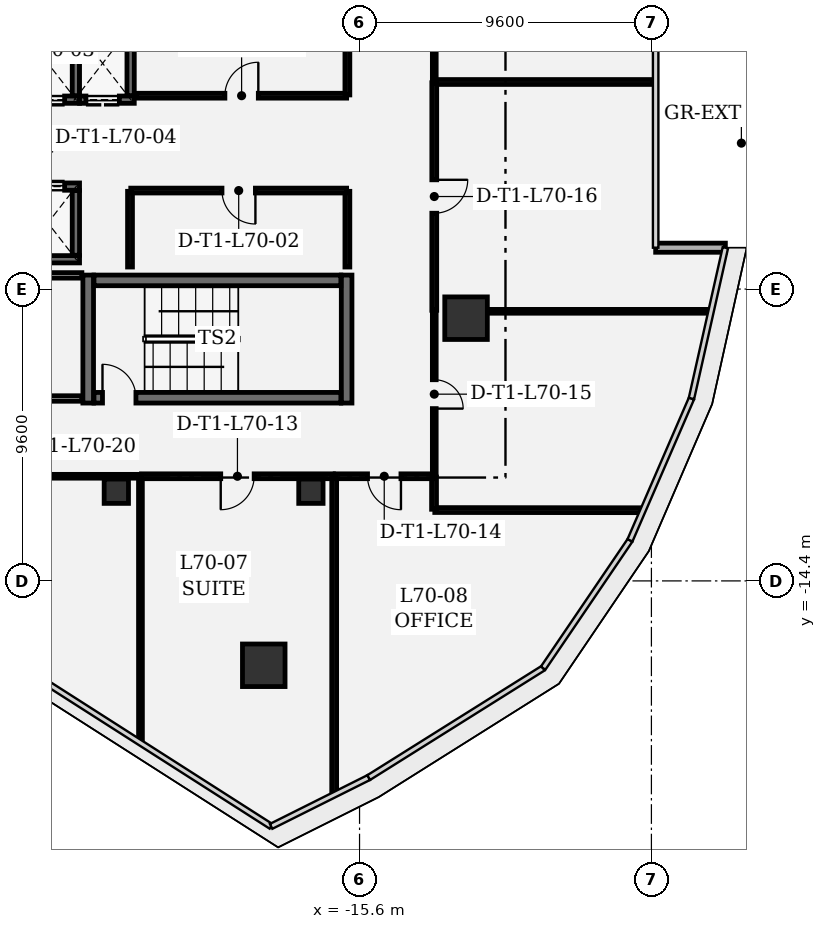
"""IFC4 building model, lengths in metres.
Left out: names, types, materials, properties, quantities, classifications, styles, units other than length and angle.
Written with IfcOpenShell. Run it as: python <this file> out.ifc"""

import sys

from ifc_helpers import new_model, si_unit, direction, frame, frame_2d, origin, origin_2d, place, context, subcontext, project, spatial, rectangle, extrude, element, fill, save


model = new_model("IFC4")
c1 = context("Model", 3, precision=1e-05, world=origin(), true_north=direction((0.0, 1.0)))
c2 = subcontext(c1, "Body", "Model", "MODEL_VIEW")
j1 = project(units=[si_unit("LENGTHUNIT", "METRE"), si_unit("PLANEANGLEUNIT", "RADIAN")], contexts=[c1])
p1 = place(None, origin())
s1 = spatial("IfcSite", under=j1, at=p1, CompositionType="ELEMENT")
p2 = place(p1, origin())
s2 = spatial("IfcBuilding", under=s1, at=p2, CompositionType="ELEMENT")
p3 = place(p2, frame((0.0, 0.0, 301.8)))
s3 = spatial("IfcBuildingStorey", under=s2, at=p3, CompositionType="ELEMENT", Elevation=301.8)
for number, where, z_axis, x_axis in (
    (1, (-18.75, -17.176, 0.0), (0.0, 0.0, 1.0), (1.0, 0.0, 0.0)),
    (2, (-12.097, -5.758, 0.0), (0.0, 0.0, 1.0), (1.0, 0.0, 0.0)),
):
    element("IfcColumn", number, at=place(p3, frame(where, z_axis=z_axis, x_axis=x_axis)), inside=s3, PredefinedType="COLUMN", context=c2, shape_type="SweptSolid", body=[
        extrude(rectangle(XDim=1.4, YDim=1.4, at=origin_2d()), origin(), (0.0, 0.0, 1.0), 4.2),
    ])
for number, where, z_axis, x_axis in (
    (3, (-17.2, -11.45, 0.0), (0.0, 0.0, 1.0), (1.0, 0.0, 0.0)),
    (4, (-23.6, -11.45, 0.0), (0.0, 0.0, 1.0), (1.0, 0.0, 0.0)),
):
    element("IfcColumn", number, at=place(p3, frame(where, z_axis=z_axis, x_axis=x_axis)), inside=s3, PredefinedType="COLUMN", context=c2, shape_type="SweptSolid", body=[
        extrude(rectangle(XDim=0.8, YDim=0.8, at=origin_2d()), origin(), (0.0, 0.0, 1.0), 4.2),
    ])
p4 = place(p3, frame((-3.567, -3.44, 0.0), z_axis=(0.0, 0.0, 1.0), x_axis=(-1.0, 0.0, 0.0)))
e5 = element("IfcWall", 5, at=p4, inside=s3, PredefinedType="SOLIDWALL", context=c2, shape_type="SweptSolid", body=[
    extrude(rectangle(XDim=2.293, YDim=0.3, at=frame_2d((1.146, 0.0))), origin(), (0.0, 0.0, 1.0), 3.91),
])
for number, where, z_axis, x_axis in (
    (6, (-24.525, -4.34, 0.0), (0.0, 0.0, 1.0), (0.0, -1.0, 0.0)),
    (7, (-16.025, -8.55, 0.0), (0.0, 0.0, 1.0), (0.0, 1.0, 0.0)),
):
    element("IfcWall", number, at=place(p3, frame(where, z_axis=z_axis, x_axis=x_axis)), inside=s3, PredefinedType="SHEAR", context=c2, shape_type="SweptSolid", body=[
        extrude(rectangle(XDim=4.21, YDim=0.35, at=frame_2d((2.105, 0.0))), origin(), (0.0, 0.0, 1.0), 3.91),
    ])
p5 = place(p3, frame((-24.335, -8.375, 0.0), z_axis=(0.0, 0.0, 1.0), x_axis=(1.0, 0.0, 0.0)))
e8 = element("IfcWall", 8, at=p5, inside=s3, PredefinedType="SHEAR", context=c2, shape_type="SweptSolid", body=[
    extrude(rectangle(XDim=8.12, YDim=0.35, at=frame_2d((4.06, 0.0))), origin(), (0.0, 0.0, 1.0), 3.91),
])
p6 = place(p5, frame((0.28, 0.0, 0.0)))
e9 = element("IfcOpeningElement", 9, at=p6, cuts=e8, PredefinedType="OPENING", context=c2, shape_type="SweptSolid", body=[
    extrude(rectangle(XDim=1.1, YDim=2.2, at=frame_2d((0.55, 1.1))), frame((0.0, 0.185, 0.0), z_axis=(0.0, -1.0, 0.0), x_axis=(1.0, 0.0, 0.0)), (0.0, 0.0, 1.0), 0.37),
])
p7 = place(p3, frame((-16.215, -4.515, 0.0), z_axis=(0.0, 0.0, 1.0), x_axis=(-1.0, 0.0, 0.0)))
e10 = element("IfcWall", 10, at=p7, inside=s3, PredefinedType="SHEAR", context=c2, shape_type="SweptSolid", body=[
    extrude(rectangle(XDim=8.12, YDim=0.35, at=frame_2d((4.06, 0.0))), origin(), (0.0, 0.0, 1.0), 3.91),
])
p8 = place(p3, frame((-24.81, 1.43, 0.0), z_axis=(0.0, 0.0, 1.0), x_axis=(-1.0, 0.0, 0.0)))
e11 = element("IfcWall", 11, at=p8, inside=s3, PredefinedType="SHEAR", context=c2, shape_type="SweptSolid", body=[
    extrude(rectangle(XDim=2.08, YDim=0.24, at=frame_2d((1.04, 0.0))), origin(), (0.0, 0.0, 1.0), 3.91),
])
p9 = place(p8, frame((0.49, 0.0, 0.0)))
e12 = element("IfcOpeningElement", 12, at=p9, cuts=e11, PredefinedType="OPENING", context=c2, shape_type="SweptSolid", body=[
    extrude(rectangle(XDim=1.1, YDim=2.2, at=frame_2d((0.55, 1.1))), frame((0.0, 0.13, 0.0), z_axis=(0.0, -1.0, 0.0), x_axis=(1.0, 0.0, 0.0)), (0.0, 0.0, 1.0), 0.26),
])
p10 = place(p3, frame((-24.93, 3.688, 0.0), z_axis=(0.0, 0.0, 1.0), x_axis=(0.0, -1.0, 0.0)))
e13 = element("IfcWall", 13, at=p10, inside=s3, PredefinedType="SHEAR", context=c2, shape_type="SweptSolid", body=[
    extrude(rectangle(XDim=2.126, YDim=0.24, at=frame_2d((1.063, 0.0))), origin(), (0.0, 0.0, 1.0), 3.91),
])
p11 = place(p3, frame((-23.01, 1.43, 0.0), z_axis=(0.0, 0.0, 1.0), x_axis=(-1.0, 0.0, 0.0)))
e14 = element("IfcWall", 14, at=p11, inside=s3, PredefinedType="SHEAR", context=c2, shape_type="SweptSolid", body=[
    extrude(rectangle(XDim=1.8, YDim=0.24, at=frame_2d((0.9, 0.0))), origin(), (0.0, 0.0, 1.0), 3.91),
])
p12 = place(p11, frame((0.49, 0.0, 0.0)))
e15 = element("IfcOpeningElement", 15, at=p12, cuts=e14, PredefinedType="OPENING", context=c2, shape_type="SweptSolid", body=[
    extrude(rectangle(XDim=1.1, YDim=2.2, at=frame_2d((0.55, 1.1))), frame((0.0, 0.13, 0.0), z_axis=(0.0, -1.0, 0.0), x_axis=(1.0, 0.0, 0.0)), (0.0, 0.0, 1.0), 0.26),
])
p13 = place(p3, frame((-23.13, 3.688, 0.0), z_axis=(0.0, 0.0, 1.0), x_axis=(0.0, -1.0, 0.0)))
e16 = element("IfcWall", 16, at=p13, inside=s3, PredefinedType="SHEAR", context=c2, shape_type="SweptSolid", body=[
    extrude(rectangle(XDim=2.126, YDim=0.24, at=frame_2d((1.063, 0.0))), origin(), (0.0, 0.0, 1.0), 3.91),
])
p14 = place(p3, frame((-24.81, -3.82, 0.0), z_axis=(0.0, 0.0, 1.0), x_axis=(-1.0, 0.0, 0.0)))
e17 = element("IfcWall", 17, at=p14, inside=s3, PredefinedType="SHEAR", context=c2, shape_type="SweptSolid", body=[
    extrude(rectangle(XDim=2.08, YDim=0.24, at=frame_2d((1.04, 0.0))), origin(), (0.0, 0.0, 1.0), 3.91),
])
p15 = place(p3, frame((-26.89, -1.43, 0.0), z_axis=(0.0, 0.0, 1.0), x_axis=(1.0, 0.0, 0.0)))
e18 = element("IfcWall", 18, at=p15, inside=s3, PredefinedType="SHEAR", context=c2, shape_type="SweptSolid", body=[
    extrude(rectangle(XDim=2.08, YDim=0.24, at=frame_2d((1.04, 0.0))), origin(), (0.0, 0.0, 1.0), 3.91),
])
p16 = place(p15, frame((0.49, 0.0, 0.0)))
e19 = element("IfcOpeningElement", 19, at=p16, cuts=e18, PredefinedType="OPENING", context=c2, shape_type="SweptSolid", body=[
    extrude(rectangle(XDim=1.1, YDim=2.2, at=frame_2d((0.55, 1.1))), frame((0.0, 0.13, 0.0), z_axis=(0.0, -1.0, 0.0), x_axis=(1.0, 0.0, 0.0)), (0.0, 0.0, 1.0), 0.26),
])
p17 = place(p3, frame((-24.93, -1.562, 0.0), z_axis=(0.0, 0.0, 1.0), x_axis=(0.0, -1.0, 0.0)))
e20 = element("IfcWall", 20, at=p17, inside=s3, PredefinedType="SHEAR", context=c2, shape_type="SweptSolid", body=[
    extrude(rectangle(XDim=2.126, YDim=0.24, at=frame_2d((1.063, 0.0))), origin(), (0.0, 0.0, 1.0), 3.91),
])
p18 = place(p3, frame((-28.355, -8.4, 0.0), z_axis=(0.0, 0.0, 1.0), x_axis=(1.0, 0.0, 0.0)))
e21 = element("IfcWall", 21, at=p18, inside=s3, PredefinedType="PARTITIONING", context=c2, shape_type="SweptSolid", body=[
    extrude(rectangle(XDim=3.622, YDim=0.18, at=frame_2d((1.811, 0.0))), origin(), (0.0, 0.0, 1.0), 3.529),
])
p19 = place(p18, frame((1.311, 0.0, 0.0)))
e22 = element("IfcOpeningElement", 22, at=p19, cuts=e21, PredefinedType="OPENING", context=c2, shape_type="SweptSolid", body=[
    extrude(rectangle(XDim=1.0, YDim=2.15, at=frame_2d((0.5, 1.075))), frame((0.0, 0.1, 0.0), z_axis=(0.0, -1.0, 0.0), x_axis=(1.0, 0.0, 0.0)), (0.0, 0.0, 1.0), 0.2),
])
p20 = place(p3, frame((-24.733, -4.35, 0.0), z_axis=(0.0, 0.0, 1.0), x_axis=(-1.0, 0.0, 0.0)))
e23 = element("IfcWall", 23, at=p20, inside=s3, PredefinedType="PARTITIONING", context=c2, shape_type="SweptSolid", body=[
    extrude(rectangle(XDim=3.622, YDim=0.18, at=frame_2d((1.811, 0.0))), origin(), (0.0, 0.0, 1.0), 3.91),
])
p21 = place(p3, frame((-22.934, 1.56, 0.0), z_axis=(0.0, 0.0, 1.0), x_axis=(1.0, 0.0, 0.0)))
e24 = element("IfcWall", 24, at=p21, inside=s3, PredefinedType="PARTITIONING", context=c2, shape_type="SweptSolid", body=[
    extrude(rectangle(XDim=6.909, YDim=0.16, at=frame_2d((3.455, 0.0))), origin(), (0.0, 0.0, 1.0), 3.91),
])
p22 = place(p21, frame((2.905, 0.0, 0.0)))
e25 = element("IfcOpeningElement", 25, at=p22, cuts=e24, PredefinedType="OPENING", context=c2, shape_type="SweptSolid", body=[
    extrude(rectangle(XDim=1.1, YDim=2.15, at=frame_2d((0.55, 1.075))), frame((0.0, 0.09, 0.0), z_axis=(0.0, -1.0, 0.0), x_axis=(1.0, 0.0, 0.0)), (0.0, 0.0, 1.0), 0.18),
])
p23 = place(p3, frame((-16.0, 1.585, 0.0), z_axis=(0.0, 0.0, 1.0), x_axis=(0.0, 1.0, 0.0)))
e26 = element("IfcWall", 26, at=p23, inside=s3, PredefinedType="PARTITIONING", context=c2, shape_type="SweptSolid", body=[
    extrude(rectangle(XDim=2.302, YDim=0.16, at=frame_2d((1.151, 0.0))), origin(), (0.0, 0.0, 1.0), 3.91),
])
for number, where, z_axis, x_axis in (
    (27, (-23.15, -1.585, 0.0), (0.0, 0.0, 1.0), (0.0, -1.0, 0.0)),
    (28, (-16.0, -4.075, 0.0), (0.0, 0.0, 1.0), (0.0, 1.0, 0.0)),
):
    element("IfcWall", number, at=place(p3, frame(where, z_axis=z_axis, x_axis=x_axis)), inside=s3, PredefinedType="PARTITIONING", context=c2, shape_type="SweptSolid", body=[
        extrude(rectangle(XDim=2.49, YDim=0.16, at=frame_2d((1.245, 0.0))), origin(), (0.0, 0.0, 1.0), 3.91),
    ])
p24 = place(p3, frame((-16.025, -1.56, 0.0), z_axis=(0.0, 0.0, 1.0), x_axis=(-1.0, 0.0, 0.0)))
e29 = element("IfcWall", 29, at=p24, inside=s3, PredefinedType="PARTITIONING", context=c2, shape_type="SweptSolid", body=[
    extrude(rectangle(XDim=7.1, YDim=0.16, at=frame_2d((3.55, 0.0))), origin(), (0.0, 0.0, 1.0), 3.91),
])
p25 = place(p24, frame((3.0, 0.0, 0.0)))
e30 = element("IfcOpeningElement", 30, at=p25, cuts=e29, PredefinedType="OPENING", context=c2, shape_type="SweptSolid", body=[
    extrude(rectangle(XDim=1.1, YDim=2.15, at=frame_2d((0.55, 1.075))), frame((0.0, 0.09, 0.0), z_axis=(0.0, -1.0, 0.0), x_axis=(1.0, 0.0, 0.0)), (0.0, 0.0, 1.0), 0.18),
])
p26 = place(p3, frame((-22.832, -10.958, 0.0), z_axis=(0.0, 0.0, 1.0), x_axis=(-1.0, 0.0, 0.0)))
e31 = element("IfcWall", 31, at=p26, inside=s3, PredefinedType="PARTITIONING", context=c2, shape_type="SweptSolid", body=[
    extrude(rectangle(XDim=7.944, YDim=0.125, at=frame_2d((3.972, 0.0))), origin(), (0.0, 0.0, 1.0), 3.13),
])
p27 = place(p26, frame((5.995, 0.0, 0.0)))
e32 = element("IfcOpeningElement", 32, at=p27, cuts=e31, PredefinedType="OPENING", context=c2, shape_type="SweptSolid", body=[
    extrude(rectangle(XDim=0.95, YDim=2.15, at=frame_2d((0.475, 1.075))), frame((0.0, 0.073, 0.0), z_axis=(0.0, -1.0, 0.0), x_axis=(1.0, 0.0, 0.0)), (0.0, 0.0, 1.0), 0.145),
])
p28 = place(p3, frame((-22.805, -19.648, 0.0), z_axis=(0.0, 0.0, 1.0), x_axis=(-0.000169052178, 0.999999985711, 0.0)))
e33 = element("IfcWall", 33, at=p28, inside=s3, PredefinedType="PARTITIONING", context=c2, shape_type="SweptSolid", body=[
    extrude(rectangle(XDim=8.665, YDim=0.125, at=frame_2d((4.333, 0.0))), origin(), (0.0, 0.0, 1.0), 3.91),
])
p29 = place(p3, frame((-16.459, -10.958, 0.0), z_axis=(0.0, 0.0, 1.0), x_axis=(-1.0, 0.0, 0.0)))
e34 = element("IfcWall", 34, at=p29, inside=s3, PredefinedType="PARTITIONING", context=c2, shape_type="SweptSolid", body=[
    extrude(rectangle(XDim=6.315, YDim=0.16, at=frame_2d((3.157, 0.0))), origin(), (0.0, 0.0, 1.0), 3.529),
])
p30 = place(p29, frame((2.607, 0.0, 0.0)))
e35 = element("IfcOpeningElement", 35, at=p30, cuts=e34, PredefinedType="OPENING", context=c2, shape_type="SweptSolid", body=[
    extrude(rectangle(XDim=1.1, YDim=2.15, at=frame_2d((0.55, 1.075))), frame((0.0, 0.09, 0.0), z_axis=(0.0, -1.0, 0.0), x_axis=(1.0, 0.0, 0.0)), (0.0, 0.0, 1.0), 0.18),
])
p31 = place(p3, frame((-16.434, -21.357, 0.0), z_axis=(0.0, 0.0, 1.0), x_axis=(2.3533842e-05, 0.999999999723, 0.0)))
e36 = element("IfcWall", 36, at=p31, inside=s3, PredefinedType="PARTITIONING", context=c2, shape_type="SweptSolid", body=[
    extrude(rectangle(XDim=10.374, YDim=0.16, at=frame_2d((5.187, 0.0))), origin(), (0.0, 0.0, 1.0), 3.13),
])
p32 = place(p3, frame((-6.355, -12.075, 0.0), z_axis=(0.0, 0.0, 1.0), x_axis=(-0.999999593545, 0.000901615329, 0.0)))
e37 = element("IfcWall", 37, at=p32, inside=s3, PredefinedType="PARTITIONING", context=c2, shape_type="SweptSolid", body=[
    extrude(rectangle(XDim=6.77, YDim=0.16, at=frame_2d((3.385, 0.0))), origin(), (0.0, 0.0, 1.0), 3.91),
])
p33 = place(p3, frame((-13.15, -10.983, 0.0), z_axis=(0.0, 0.0, 1.0), x_axis=(0.0, -1.0, 0.0)))
e38 = element("IfcWall", 38, at=p33, inside=s3, PredefinedType="PARTITIONING", context=c2, shape_type="SweptSolid", body=[
    extrude(rectangle(XDim=1.061, YDim=0.16, at=frame_2d((0.53, 0.0))), origin(), (0.0, 0.0, 1.0), 3.91),
])
p34 = place(p3, frame((-13.175, -10.958, 0.0), z_axis=(0.0, 0.0, 1.0), x_axis=(-1.0, 0.0, 0.0)))
e39 = element("IfcWall", 39, at=p34, inside=s3, PredefinedType="PARTITIONING", context=c2, shape_type="SweptSolid", body=[
    extrude(rectangle(XDim=3.226, YDim=0.16, at=frame_2d((1.613, 0.0))), origin(), (0.0, 0.0, 1.0), 3.91),
])
p35 = place(p34, frame((1.063, 0.0, 0.0)))
e40 = element("IfcOpeningElement", 40, at=p35, cuts=e39, PredefinedType="OPENING", context=c2, shape_type="SweptSolid", body=[
    extrude(rectangle(XDim=1.1, YDim=2.15, at=frame_2d((0.55, 1.075))), frame((0.0, 0.09, 0.0), z_axis=(0.0, -1.0, 0.0), x_axis=(1.0, 0.0, 0.0)), (0.0, 0.0, 1.0), 0.18),
])
p36 = place(p3, frame((-4.118, -5.532, 0.0), z_axis=(0.0, 0.0, 1.0), x_axis=(-1.0, 0.0, 0.0)))
e41 = element("IfcWall", 41, at=p36, inside=s3, PredefinedType="PARTITIONING", context=c2, shape_type="SweptSolid", body=[
    extrude(rectangle(XDim=7.214, YDim=0.125, at=frame_2d((3.607, 0.0))), origin(), (0.0, 0.0, 1.0), 3.91),
])
p37 = place(p3, frame((-13.142, -5.557, 0.0), z_axis=(0.0, 0.0, 1.0), x_axis=(0.0, -1.0, 0.0)))
e42 = element("IfcWall", 42, at=p37, inside=s3, PredefinedType="PARTITIONING", context=c2, shape_type="SweptSolid", body=[
    extrude(rectangle(XDim=5.401, YDim=0.125, at=frame_2d((2.701, 0.0))), origin(), (0.0, 0.0, 1.0), 3.13),
])
p38 = place(p37, frame((2.226, 0.0, 0.0)))
e43 = element("IfcOpeningElement", 43, at=p38, cuts=e42, PredefinedType="OPENING", context=c2, shape_type="SweptSolid", body=[
    extrude(rectangle(XDim=0.95, YDim=2.15, at=frame_2d((0.475, 1.075))), frame((0.0, 0.073, 0.0), z_axis=(0.0, -1.0, 0.0), x_axis=(1.0, 0.0, 0.0)), (0.0, 0.0, 1.0), 0.145),
])
p39 = place(p3, frame((-5.941, 2.011, 0.0), z_axis=(0.0, 0.0, 1.0), x_axis=(-1.0, 0.0, 0.0)))
e44 = element("IfcWall", 44, at=p39, inside=s3, PredefinedType="PARTITIONING", context=c2, shape_type="SweptSolid", body=[
    extrude(rectangle(XDim=7.177, YDim=0.16, at=frame_2d((3.588, 0.0))), origin(), (0.0, 0.0, 1.0), 3.91),
])
p40 = place(p3, frame((-13.142, 1.986, 0.0), z_axis=(0.0, 0.0, 1.0), x_axis=(0.0, -1.0, 0.0)))
e45 = element("IfcWall", 45, at=p40, inside=s3, PredefinedType="PARTITIONING", context=c2, shape_type="SweptSolid", body=[
    extrude(rectangle(XDim=7.485, YDim=0.16, at=frame_2d((3.742, 0.0))), origin(), (0.0, 0.0, 1.0), 3.91),
])
p41 = place(p40, frame((3.192, 0.0, 0.0)))
e46 = element("IfcOpeningElement", 46, at=p41, cuts=e45, PredefinedType="OPENING", context=c2, shape_type="SweptSolid", body=[
    extrude(rectangle(XDim=1.1, YDim=2.15, at=frame_2d((0.55, 1.075))), frame((0.0, 0.09, 0.0), z_axis=(0.0, -1.0, 0.0), x_axis=(1.0, 0.0, 0.0)), (0.0, 0.0, 1.0), 0.18),
])
p42 = place(p3, frame((-13.142, 10.691, 0.0), z_axis=(0.0, 0.0, 1.0), x_axis=(0.0, -1.0, 0.0)))
e47 = element("IfcWall", 47, at=p42, inside=s3, PredefinedType="PARTITIONING", context=c2, shape_type="SweptSolid", body=[
    extrude(rectangle(XDim=8.647, YDim=0.125, at=frame_2d((4.324, 0.0))), origin(), (0.0, 0.0, 1.0), 3.13),
])
p43 = place(p42, frame((2.749, 0.0, 0.0)))
e48 = element("IfcOpeningElement", 48, at=p43, cuts=e47, PredefinedType="OPENING", context=c2, shape_type="SweptSolid", body=[
    extrude(rectangle(XDim=0.95, YDim=2.15, at=frame_2d((0.475, 1.075))), frame((0.0, 0.073, 0.0), z_axis=(0.0, -1.0, 0.0), x_axis=(1.0, 0.0, 0.0)), (0.0, 0.0, 1.0), 0.145),
])
p44 = place(p6, origin())
e49 = element("IfcDoor", 49, at=p44, inside=s3, OperationType="SINGLE_SWING_LEFT", PredefinedType="DOOR", context=c2, shape_type="SweptSolid", body=[
    extrude(rectangle(XDim=1.1, YDim=2.2, at=frame_2d((0.55, 1.1))), frame((0.0, 0.025, 0.0), z_axis=(0.0, -1.0, 0.0), x_axis=(1.0, 0.0, 0.0)), (0.0, 0.0, 1.0), 0.05),
])
fill(e9, e49)
p45 = place(p9, origin())
e50 = element("IfcDoor", 50, at=p45, inside=s3, OperationType="DOUBLE_DOOR_SLIDING", PredefinedType="DOOR", context=c2, shape_type="SweptSolid", body=[
    extrude(rectangle(XDim=1.1, YDim=2.2, at=frame_2d((0.55, 1.1))), frame((0.0, 0.025, 0.0), z_axis=(0.0, -1.0, 0.0), x_axis=(1.0, 0.0, 0.0)), (0.0, 0.0, 1.0), 0.05),
])
fill(e12, e50)
p46 = place(p12, origin())
e51 = element("IfcDoor", 51, at=p46, inside=s3, OperationType="DOUBLE_DOOR_SLIDING", PredefinedType="DOOR", context=c2, shape_type="SweptSolid", body=[
    extrude(rectangle(XDim=1.1, YDim=2.2, at=frame_2d((0.55, 1.1))), frame((0.0, 0.025, 0.0), z_axis=(0.0, -1.0, 0.0), x_axis=(1.0, 0.0, 0.0)), (0.0, 0.0, 1.0), 0.05),
])
fill(e15, e51)
p47 = place(p16, origin())
e52 = element("IfcDoor", 52, at=p47, inside=s3, OperationType="DOUBLE_DOOR_SLIDING", PredefinedType="DOOR", context=c2, shape_type="SweptSolid", body=[
    extrude(rectangle(XDim=1.1, YDim=2.2, at=frame_2d((0.55, 1.1))), frame((0.0, 0.025, 0.0), z_axis=(0.0, -1.0, 0.0), x_axis=(1.0, 0.0, 0.0)), (0.0, 0.0, 1.0), 0.05),
])
fill(e19, e52)
p48 = place(p22, origin())
e53 = element("IfcDoor", 53, at=p48, inside=s3, OperationType="SINGLE_SWING_RIGHT", PredefinedType="DOOR", context=c2, shape_type="SweptSolid", body=[
    extrude(rectangle(XDim=1.1, YDim=2.15, at=frame_2d((0.55, 1.075))), frame((0.0, 0.025, 0.0), z_axis=(0.0, -1.0, 0.0), x_axis=(1.0, 0.0, 0.0)), (0.0, 0.0, 1.0), 0.05),
])
fill(e25, e53)
p49 = place(p25, origin())
e54 = element("IfcDoor", 54, at=p49, inside=s3, OperationType="SINGLE_SWING_LEFT", PredefinedType="DOOR", context=c2, shape_type="SweptSolid", body=[
    extrude(rectangle(XDim=1.1, YDim=2.15, at=frame_2d((0.55, 1.075))), frame((0.0, 0.025, 0.0), z_axis=(0.0, -1.0, 0.0), x_axis=(1.0, 0.0, 0.0)), (0.0, 0.0, 1.0), 0.05),
])
fill(e30, e54)
p50 = place(p30, origin())
e55 = element("IfcDoor", 55, at=p50, inside=s3, OperationType="SINGLE_SWING_RIGHT", PredefinedType="DOOR", context=c2, shape_type="SweptSolid", body=[
    extrude(rectangle(XDim=1.1, YDim=2.15, at=frame_2d((0.55, 1.075))), frame((0.0, 0.025, 0.0), z_axis=(0.0, -1.0, 0.0), x_axis=(1.0, 0.0, 0.0)), (0.0, 0.0, 1.0), 0.05),
])
fill(e35, e55)
p51 = place(p35, origin())
e56 = element("IfcDoor", 56, at=p51, inside=s3, OperationType="SINGLE_SWING_LEFT", PredefinedType="DOOR", context=c2, shape_type="SweptSolid", body=[
    extrude(rectangle(XDim=1.1, YDim=2.15, at=frame_2d((0.55, 1.075))), frame((0.0, 0.025, 0.0), z_axis=(0.0, -1.0, 0.0), x_axis=(1.0, 0.0, 0.0)), (0.0, 0.0, 1.0), 0.05),
])
fill(e40, e56)
p52 = place(p38, origin())
e57 = element("IfcDoor", 57, at=p52, inside=s3, OperationType="SINGLE_SWING_RIGHT", PredefinedType="DOOR", context=c2, shape_type="SweptSolid", body=[
    extrude(rectangle(XDim=0.95, YDim=2.15, at=frame_2d((0.475, 1.075))), frame((0.0, 0.025, 0.0), z_axis=(0.0, -1.0, 0.0), x_axis=(1.0, 0.0, 0.0)), (0.0, 0.0, 1.0), 0.05),
])
fill(e43, e57)
p53 = place(p41, origin())
e58 = element("IfcDoor", 58, at=p53, inside=s3, OperationType="SINGLE_SWING_LEFT", PredefinedType="DOOR", context=c2, shape_type="SweptSolid", body=[
    extrude(rectangle(XDim=1.1, YDim=2.15, at=frame_2d((0.55, 1.075))), frame((0.0, 0.025, 0.0), z_axis=(0.0, -1.0, 0.0), x_axis=(1.0, 0.0, 0.0)), (0.0, 0.0, 1.0), 0.05),
])
fill(e46, e58)
save(model, sys.argv[1])
